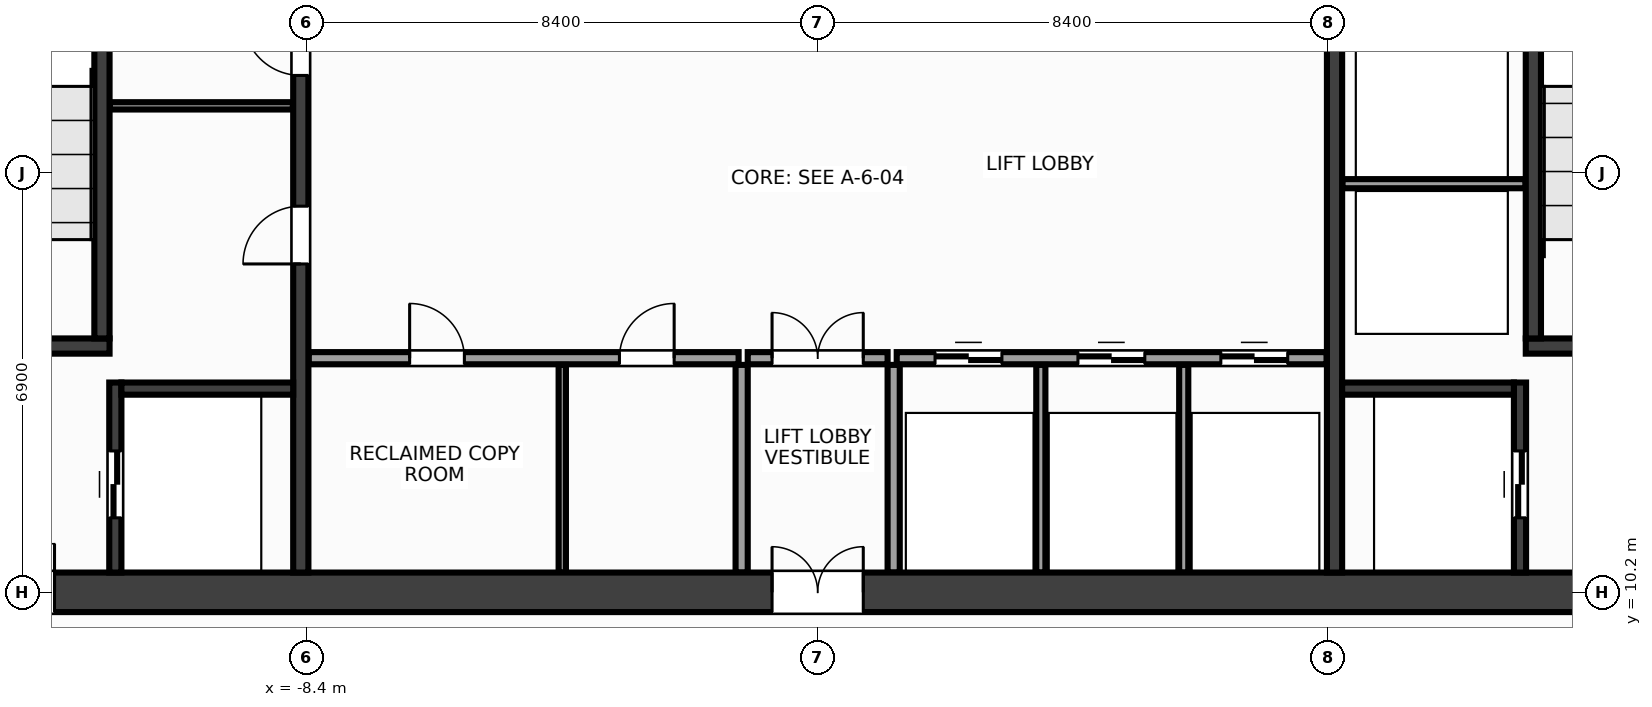
"""IFC4 building model, lengths in metres.
Left out: names, types, materials, properties, quantities, classifications, styles, units other than length and angle.
Written with IfcOpenShell. Run it as: python <this file> out.ifc"""

import sys

from ifc_helpers import new_model, si_unit, direction, frame, frame_2d, origin, place, context, subcontext, project, spatial, rectangle, extrude, source, transform, mapped, element, fill, save


model = new_model("IFC4")
c1 = context("Model", 3, precision=1e-05, world=origin(), true_north=direction((0.0, 1.0)))
c2 = subcontext(c1, "Body", "Model", "MODEL_VIEW")
j1 = project(units=[si_unit("LENGTHUNIT", "METRE"), si_unit("PLANEANGLEUNIT", "RADIAN")], contexts=[c1])
p1 = place(None, origin())
s1 = spatial("IfcSite", under=j1, at=p1, CompositionType="ELEMENT")
p2 = place(p1, origin())
s2 = spatial("IfcBuilding", under=s1, at=p2, CompositionType="ELEMENT")
p3 = place(p2, frame((0.0, 0.0, 120.8)))
s3 = spatial("IfcBuildingStorey", under=s2, at=p3, CompositionType="ELEMENT", Elevation=120.8)
m1 = source(origin(), c2, "Body", "SweptSolid", [
    extrude(rectangle(XDim=31.85, YDim=0.65, at=frame_2d((15.925, 0.0))), origin(), (0.0, 0.0, 1.0), 3.6),
])
p4 = place(p3, frame((-15.925, 10.2, 0.0), z_axis=(0.0, 0.0, 1.0), x_axis=(1.0, 0.0, 0.0)))
e1 = element("IfcWall", 1, at=p4, inside=s3, PredefinedType="SHEAR", context=c2, shape_type="MappedRepresentation", body=[
    mapped(m1, transform((0.0, 0.0, 0.0), x_axis=(1.0, 0.0, 0.0), y_axis=(0.0, 1.0, 0.0), z_axis=(0.0, 0.0, 1.0), scale=1.0)),
])
p5 = place(p4, frame((1.775, 0.0, 0.0)))
e2 = element("IfcOpeningElement", 2, at=p5, cuts=e1, PredefinedType="OPENING", context=c2, shape_type="SweptSolid", body=[
    extrude(rectangle(XDim=1.6, YDim=2.15, at=frame_2d((0.8, 1.075))), frame((0.0, 0.337, 0.0), z_axis=(0.0, -1.0, 0.0), x_axis=(1.0, 0.0, 0.0)), (0.0, 0.0, 1.0), 0.674),
])
p6 = place(p4, frame((28.475, 0.0, 0.0)))
e3 = element("IfcOpeningElement", 3, at=p6, cuts=e1, PredefinedType="OPENING", context=c2, shape_type="SweptSolid", body=[
    extrude(rectangle(XDim=1.6, YDim=2.15, at=frame_2d((0.8, 1.075))), frame((0.0, 0.337, 0.0), z_axis=(0.0, -1.0, 0.0), x_axis=(1.0, 0.0, 0.0)), (0.0, 0.0, 1.0), 0.674),
])
p7 = place(p4, frame((15.175, 0.0, 0.0)))
e4 = element("IfcOpeningElement", 4, at=p7, cuts=e1, PredefinedType="OPENING", context=c2, shape_type="SweptSolid", body=[
    extrude(rectangle(XDim=1.5, YDim=2.2, at=frame_2d((0.75, 1.1))), frame((0.0, 0.337, 0.0), z_axis=(0.0, -1.0, 0.0), x_axis=(1.0, 0.0, 0.0)), (0.0, 0.0, 1.0), 0.674),
])
m2 = source(origin(), c2, "Body", "SweptSolid", [
    extrude(rectangle(XDim=12.95, YDim=0.25, at=frame_2d((6.475, 0.0))), origin(), (0.0, 0.0, 1.0), 3.6),
])
p8 = place(p3, frame((-8.5, 10.525, 0.0), z_axis=(0.0, 0.0, 1.0), x_axis=(0.0, 1.0, 0.0)))
e5 = element("IfcWall", 5, at=p8, inside=s3, PredefinedType="SHEAR", context=c2, shape_type="MappedRepresentation", body=[
    mapped(m2, transform((0.0, 0.0, 0.0), x_axis=(1.0, 0.0, 0.0), y_axis=(0.0, 1.0, 0.0), z_axis=(0.0, 0.0, 1.0), scale=1.0)),
])
p9 = place(p8, frame((5.075, 0.0, 0.0)))
e6 = element("IfcOpeningElement", 6, at=p9, cuts=e5, PredefinedType="OPENING", context=c2, shape_type="SweptSolid", body=[
    extrude(rectangle(XDim=0.95, YDim=2.15, at=frame_2d((0.475, 1.075))), frame((0.0, 0.137, 0.0), z_axis=(0.0, -1.0, 0.0), x_axis=(1.0, 0.0, 0.0)), (0.0, 0.0, 1.0), 0.274),
])
p10 = place(p8, frame((8.175, 0.0, 0.0)))
e7 = element("IfcOpeningElement", 7, at=p10, cuts=e5, PredefinedType="OPENING", context=c2, shape_type="SweptSolid", body=[
    extrude(rectangle(XDim=0.95, YDim=2.15, at=frame_2d((0.475, 1.075))), frame((0.0, 0.137, 0.0), z_axis=(0.0, -1.0, 0.0), x_axis=(1.0, 0.0, 0.0)), (0.0, 0.0, 1.0), 0.274),
])
p11 = place(p3, frame((8.5, 10.525, 0.0), z_axis=(0.0, 0.0, 1.0), x_axis=(0.0, 1.0, 0.0)))
e8 = element("IfcWall", 8, at=p11, inside=s3, PredefinedType="SHEAR", context=c2, shape_type="MappedRepresentation", body=[
    mapped(m2, transform((0.0, 0.0, 0.0), x_axis=(1.0, 0.0, 0.0), y_axis=(0.0, 1.0, 0.0), z_axis=(0.0, 0.0, 1.0), scale=1.0)),
])
p12 = place(p11, frame((9.925, 0.0, 0.0)))
e9 = element("IfcOpeningElement", 9, at=p12, cuts=e8, PredefinedType="OPENING", context=c2, shape_type="SweptSolid", body=[
    extrude(rectangle(XDim=0.95, YDim=2.15, at=frame_2d((0.475, 1.075))), frame((0.0, 0.137, 0.0), z_axis=(0.0, -1.0, 0.0), x_axis=(1.0, 0.0, 0.0)), (0.0, 0.0, 1.0), 0.274),
])
m3 = source(origin(), c2, "Body", "SweptSolid", [
    extrude(rectangle(XDim=3.63, YDim=0.25, at=frame_2d((1.815, 0.0))), origin(), (0.0, 0.0, 1.0), 3.6),
])
p13 = place(p3, frame((-15.275, 14.25, 0.0), z_axis=(0.0, 0.0, 1.0), x_axis=(1.0, 0.0, 0.0)))
e10 = element("IfcWall", 10, at=p13, inside=s3, PredefinedType="SHEAR", context=c2, shape_type="MappedRepresentation", body=[
    mapped(m3, transform((0.0, 0.0, 0.0), x_axis=(1.0, 0.0, 0.0), y_axis=(0.0, 1.0, 0.0), z_axis=(0.0, 0.0, 1.0), scale=1.0)),
])
p14 = place(p13, frame((0.95, 0.0, 0.0)))
e11 = element("IfcOpeningElement", 11, at=p14, cuts=e10, PredefinedType="OPENING", context=c2, shape_type="SweptSolid", body=[
    extrude(rectangle(XDim=1.6, YDim=2.15, at=frame_2d((0.8, 1.075))), frame((0.0, 0.137, 0.0), z_axis=(0.0, -1.0, 0.0), x_axis=(1.0, 0.0, 0.0)), (0.0, 0.0, 1.0), 0.274),
])
m4 = source(origin(), c2, "Body", "SweptSolid", [
    extrude(rectangle(XDim=9.1, YDim=0.25, at=frame_2d((4.55, 0.0))), origin(), (0.0, 0.0, 1.0), 3.6),
])
p15 = place(p3, frame((-11.77, 14.375, 0.0), z_axis=(0.0, 0.0, 1.0), x_axis=(0.0, 1.0, 0.0)))
e12 = element("IfcWall", 12, at=p15, inside=s3, PredefinedType="SHEAR", context=c2, shape_type="MappedRepresentation", body=[
    mapped(m4, transform((0.0, 0.0, 0.0), x_axis=(1.0, 0.0, 0.0), y_axis=(0.0, 1.0, 0.0), z_axis=(0.0, 0.0, 1.0), scale=1.0)),
])
p16 = place(p3, frame((11.645, 14.25, 0.0), z_axis=(0.0, 0.0, 1.0), x_axis=(1.0, 0.0, 0.0)))
e13 = element("IfcWall", 13, at=p16, inside=s3, PredefinedType="SHEAR", context=c2, shape_type="MappedRepresentation", body=[
    mapped(m3, transform((0.0, 0.0, 0.0), x_axis=(1.0, 0.0, 0.0), y_axis=(0.0, 1.0, 0.0), z_axis=(0.0, 0.0, 1.0), scale=1.0)),
])
p17 = place(p16, frame((0.95, 0.0, 0.0)))
e14 = element("IfcOpeningElement", 14, at=p17, cuts=e13, PredefinedType="OPENING", context=c2, shape_type="SweptSolid", body=[
    extrude(rectangle(XDim=1.6, YDim=2.15, at=frame_2d((0.8, 1.075))), frame((0.0, 0.137, 0.0), z_axis=(0.0, -1.0, 0.0), x_axis=(1.0, 0.0, 0.0)), (0.0, 0.0, 1.0), 0.274),
])
p18 = place(p3, frame((11.77, 14.375, 0.0), z_axis=(0.0, 0.0, 1.0), x_axis=(0.0, 1.0, 0.0)))
e15 = element("IfcWall", 15, at=p18, inside=s3, PredefinedType="SHEAR", context=c2, shape_type="MappedRepresentation", body=[
    mapped(m4, transform((0.0, 0.0, 0.0), x_axis=(1.0, 0.0, 0.0), y_axis=(0.0, 1.0, 0.0), z_axis=(0.0, 0.0, 1.0), scale=1.0)),
])
m5 = source(origin(), c2, "Body", "SweptSolid", [
    extrude(rectangle(XDim=3.125, YDim=0.2, at=frame_2d((1.562, 0.0))), origin(), (0.0, 0.0, 1.0), 3.6),
])
p19 = place(p3, frame((-11.55, 10.525, 0.0), z_axis=(0.0, 0.0, 1.0), x_axis=(0.0, 1.0, 0.0)))
e16 = element("IfcWall", 16, at=p19, inside=s3, PredefinedType="SHEAR", context=c2, shape_type="MappedRepresentation", body=[
    mapped(m5, transform((0.0, 0.0, 0.0), x_axis=(1.0, 0.0, 0.0), y_axis=(0.0, 1.0, 0.0), z_axis=(0.0, 0.0, 1.0), scale=1.0)),
])
p20 = place(p19, frame((0.9, 0.0, 0.0)))
e17 = element("IfcOpeningElement", 17, at=p20, cuts=e16, PredefinedType="OPENING", context=c2, shape_type="SweptSolid", body=[
    extrude(rectangle(XDim=1.1, YDim=2.15, at=frame_2d((0.55, 1.075))), frame((0.0, 0.112, 0.0), z_axis=(0.0, -1.0, 0.0), x_axis=(1.0, 0.0, 0.0)), (0.0, 0.0, 1.0), 0.224),
])
m6 = source(origin(), c2, "Body", "SweptSolid", [
    extrude(rectangle(XDim=2.825, YDim=0.2, at=frame_2d((1.413, 0.0))), origin(), (0.0, 0.0, 1.0), 3.6),
])
p21 = place(p3, frame((-11.45, 13.55, 0.0), z_axis=(0.0, 0.0, 1.0), x_axis=(1.0, 0.0, 0.0)))
e18 = element("IfcWall", 18, at=p21, inside=s3, PredefinedType="SHEAR", context=c2, shape_type="MappedRepresentation", body=[
    mapped(m6, transform((0.0, 0.0, 0.0), x_axis=(1.0, 0.0, 0.0), y_axis=(0.0, 1.0, 0.0), z_axis=(0.0, 0.0, 1.0), scale=1.0)),
])
p22 = place(p3, frame((11.55, 10.525, 0.0), z_axis=(0.0, 0.0, 1.0), x_axis=(0.0, 1.0, 0.0)))
e19 = element("IfcWall", 19, at=p22, inside=s3, PredefinedType="SHEAR", context=c2, shape_type="MappedRepresentation", body=[
    mapped(m5, transform((0.0, 0.0, 0.0), x_axis=(1.0, 0.0, 0.0), y_axis=(0.0, 1.0, 0.0), z_axis=(0.0, 0.0, 1.0), scale=1.0)),
])
p23 = place(p22, frame((0.9, 0.0, 0.0)))
e20 = element("IfcOpeningElement", 20, at=p23, cuts=e19, PredefinedType="OPENING", context=c2, shape_type="SweptSolid", body=[
    extrude(rectangle(XDim=1.1, YDim=2.15, at=frame_2d((0.55, 1.075))), frame((0.0, 0.112, 0.0), z_axis=(0.0, -1.0, 0.0), x_axis=(1.0, 0.0, 0.0)), (0.0, 0.0, 1.0), 0.224),
])
p24 = place(p3, frame((8.625, 13.55, 0.0), z_axis=(0.0, 0.0, 1.0), x_axis=(1.0, 0.0, 0.0)))
e21 = element("IfcWall", 21, at=p24, inside=s3, PredefinedType="SHEAR", context=c2, shape_type="MappedRepresentation", body=[
    mapped(m6, transform((0.0, 0.0, 0.0), x_axis=(1.0, 0.0, 0.0), y_axis=(0.0, 1.0, 0.0), z_axis=(0.0, 0.0, 1.0), scale=1.0)),
])
m7 = source(origin(), c2, "Body", "SweptSolid", [
    extrude(rectangle(XDim=3.01, YDim=0.12, at=frame_2d((1.505, 0.0))), origin(), (0.0, 0.0, 1.0), 3.3),
])
p25 = place(p3, frame((-11.64, 18.2, 0.0), z_axis=(0.0, 0.0, 1.0), x_axis=(1.0, 0.0, 0.0)))
e22 = element("IfcWall", 22, at=p25, inside=s3, PredefinedType="PARTITIONING", context=c2, shape_type="MappedRepresentation", body=[
    mapped(m7, transform((0.0, 0.0, 0.0), x_axis=(1.0, 0.0, 0.0), y_axis=(0.0, 1.0, 0.0), z_axis=(0.0, 0.0, 1.0), scale=1.0)),
])
m8 = source(origin(), c2, "Body", "SweptSolid", [
    extrude(rectangle(XDim=3.01, YDim=0.15, at=frame_2d((1.505, 0.0))), origin(), (0.0, 0.0, 1.0), 3.3),
])
p26 = place(p3, frame((8.63, 16.92, 0.0), z_axis=(0.0, 0.0, 1.0), x_axis=(1.0, 0.0, 0.0)))
e23 = element("IfcWall", 23, at=p26, inside=s3, PredefinedType="PARTITIONING", context=c2, shape_type="MappedRepresentation", body=[
    mapped(m8, transform((0.0, 0.0, 0.0), x_axis=(1.0, 0.0, 0.0), y_axis=(0.0, 1.0, 0.0), z_axis=(0.0, 0.0, 1.0), scale=1.0)),
])
m9 = source(origin(), c2, "Body", "SweptSolid", [
    extrude(rectangle(XDim=7.07, YDim=0.2, at=frame_2d((3.535, 0.0))), origin(), (0.0, 0.0, 1.0), 3.3),
])
p27 = place(p3, frame((-8.37, 14.05, 0.0), z_axis=(0.0, 0.0, 1.0), x_axis=(1.0, 0.0, 0.0)))
e24 = element("IfcWall", 24, at=p27, inside=s3, PredefinedType="PARTITIONING", context=c2, shape_type="MappedRepresentation", body=[
    mapped(m9, transform((0.0, 0.0, 0.0), x_axis=(1.0, 0.0, 0.0), y_axis=(0.0, 1.0, 0.0), z_axis=(0.0, 0.0, 1.0), scale=1.0)),
])
p28 = place(p27, frame((1.66, 0.0, 0.0)))
e25 = element("IfcOpeningElement", 25, at=p28, cuts=e24, PredefinedType="OPENING", context=c2, shape_type="SweptSolid", body=[
    extrude(rectangle(XDim=0.9, YDim=2.15, at=frame_2d((0.45, 1.075))), frame((0.0, 0.112, 0.0), z_axis=(0.0, -1.0, 0.0), x_axis=(1.0, 0.0, 0.0)), (0.0, 0.0, 1.0), 0.224),
])
p29 = place(p27, frame((5.11, 0.0, 0.0)))
e26 = element("IfcOpeningElement", 26, at=p29, cuts=e24, PredefinedType="OPENING", context=c2, shape_type="SweptSolid", body=[
    extrude(rectangle(XDim=0.9, YDim=2.15, at=frame_2d((0.45, 1.075))), frame((0.0, 0.112, 0.0), z_axis=(0.0, -1.0, 0.0), x_axis=(1.0, 0.0, 0.0)), (0.0, 0.0, 1.0), 0.224),
])
p30 = place(p3, frame((1.3, 14.05, 0.0), z_axis=(0.0, 0.0, 1.0), x_axis=(1.0, 0.0, 0.0)))
e27 = element("IfcWall", 27, at=p30, inside=s3, PredefinedType="PARTITIONING", context=c2, shape_type="MappedRepresentation", body=[
    mapped(m9, transform((0.0, 0.0, 0.0), x_axis=(1.0, 0.0, 0.0), y_axis=(0.0, 1.0, 0.0), z_axis=(0.0, 0.0, 1.0), scale=1.0)),
])
p31 = place(p30, frame((0.63, 0.0, 0.0)))
e28 = element("IfcOpeningElement", 28, at=p31, cuts=e27, PredefinedType="OPENING", context=c2, shape_type="SweptSolid", body=[
    extrude(rectangle(XDim=1.1, YDim=2.15, at=frame_2d((0.55, 1.075))), frame((0.0, 0.112, 0.0), z_axis=(0.0, -1.0, 0.0), x_axis=(1.0, 0.0, 0.0)), (0.0, 0.0, 1.0), 0.224),
])
p32 = place(p30, frame((2.98, 0.0, 0.0)))
e29 = element("IfcOpeningElement", 29, at=p32, cuts=e27, PredefinedType="OPENING", context=c2, shape_type="SweptSolid", body=[
    extrude(rectangle(XDim=1.1, YDim=2.15, at=frame_2d((0.55, 1.075))), frame((0.0, 0.112, 0.0), z_axis=(0.0, -1.0, 0.0), x_axis=(1.0, 0.0, 0.0)), (0.0, 0.0, 1.0), 0.224),
])
p33 = place(p30, frame((5.33, 0.0, 0.0)))
e30 = element("IfcOpeningElement", 30, at=p33, cuts=e27, PredefinedType="OPENING", context=c2, shape_type="SweptSolid", body=[
    extrude(rectangle(XDim=1.1, YDim=2.15, at=frame_2d((0.55, 1.075))), frame((0.0, 0.112, 0.0), z_axis=(0.0, -1.0, 0.0), x_axis=(1.0, 0.0, 0.0)), (0.0, 0.0, 1.0), 0.224),
])
m10 = source(origin(), c2, "Body", "SweptSolid", [
    extrude(rectangle(XDim=3.415, YDim=0.2, at=frame_2d((1.708, 0.0))), origin(), (0.0, 0.0, 1.0), 3.3),
])
for number, where, z_axis, x_axis in (
    (31, (-1.25, 10.525, 0.0), (0.0, 0.0, 1.0), (0.0, 1.0, 0.0)),
    (32, (1.25, 10.525, 0.0), (0.0, 0.0, 1.0), (0.0, 1.0, 0.0)),
):
    element("IfcWall", number, at=place(p3, frame(where, z_axis=z_axis, x_axis=x_axis)), inside=s3, PredefinedType="PARTITIONING", context=c2, shape_type="MappedRepresentation", body=[
        mapped(m10, transform((0.0, 0.0, 0.0), x_axis=(1.0, 0.0, 0.0), y_axis=(0.0, 1.0, 0.0), z_axis=(0.0, 0.0, 1.0), scale=1.0)),
    ])
m11 = source(origin(), c2, "Body", "SweptSolid", [
    extrude(rectangle(XDim=2.3, YDim=0.2, at=frame_2d((1.15, 0.0))), origin(), (0.0, 0.0, 1.0), 3.3),
])
p34 = place(p3, frame((-1.15, 14.05, 0.0), z_axis=(0.0, 0.0, 1.0), x_axis=(1.0, 0.0, 0.0)))
e33 = element("IfcWall", 33, at=p34, inside=s3, PredefinedType="PARTITIONING", context=c2, shape_type="MappedRepresentation", body=[
    mapped(m11, transform((0.0, 0.0, 0.0), x_axis=(1.0, 0.0, 0.0), y_axis=(0.0, 1.0, 0.0), z_axis=(0.0, 0.0, 1.0), scale=1.0)),
])
p35 = place(p34, frame((0.4, 0.0, 0.0)))
e34 = element("IfcOpeningElement", 34, at=p35, cuts=e33, PredefinedType="OPENING", context=c2, shape_type="SweptSolid", body=[
    extrude(rectangle(XDim=1.5, YDim=2.2, at=frame_2d((0.75, 1.1))), frame((0.0, 0.112, 0.0), z_axis=(0.0, -1.0, 0.0), x_axis=(1.0, 0.0, 0.0)), (0.0, 0.0, 1.0), 0.224),
])
m12 = source(origin(), c2, "Body", "SweptSolid", [
    extrude(rectangle(XDim=3.415, YDim=0.12, at=frame_2d((1.708, 0.0))), origin(), (0.0, 0.0, 1.0), 3.3),
])
p36 = place(p3, frame((-4.2, 10.525, 0.0), z_axis=(0.0, 0.0, 1.0), x_axis=(0.0, 1.0, 0.0)))
e35 = element("IfcWall", 35, at=p36, inside=s3, PredefinedType="PARTITIONING", context=c2, shape_type="MappedRepresentation", body=[
    mapped(m12, transform((0.0, 0.0, 0.0), x_axis=(1.0, 0.0, 0.0), y_axis=(0.0, 1.0, 0.0), z_axis=(0.0, 0.0, 1.0), scale=1.0)),
])
m13 = source(origin(), c2, "Body", "SweptSolid", [
    extrude(rectangle(XDim=3.415, YDim=0.15, at=frame_2d((1.708, 0.0))), origin(), (0.0, 0.0, 1.0), 3.3),
])
for number, where, z_axis, x_axis in (
    (36, (3.67, 10.525, 0.0), (0.0, 0.0, 1.0), (0.0, 1.0, 0.0)),
    (37, (6.02, 10.525, 0.0), (0.0, 0.0, 1.0), (0.0, 1.0, 0.0)),
):
    element("IfcWall", number, at=place(p3, frame(where, z_axis=z_axis, x_axis=x_axis)), inside=s3, PredefinedType="PARTITIONING", context=c2, shape_type="MappedRepresentation", body=[
        mapped(m13, transform((0.0, 0.0, 0.0), x_axis=(1.0, 0.0, 0.0), y_axis=(0.0, 1.0, 0.0), z_axis=(0.0, 0.0, 1.0), scale=1.0)),
    ])
m14 = source(origin(), c2, "Body", "SweptSolid", [
    extrude(rectangle(XDim=1.6, YDim=2.15, at=frame_2d((0.8, 1.075))), frame((0.0, 0.025, 0.0), z_axis=(0.0, -1.0, 0.0), x_axis=(1.0, 0.0, 0.0)), (0.0, 0.0, 1.0), 0.05),
])
p37 = place(p5, origin())
e38 = element("IfcDoor", 38, at=p37, inside=s3, OperationType="DOUBLE_DOOR_SINGLE_SWING", PredefinedType="DOOR", context=c2, shape_type="MappedRepresentation", body=[
    mapped(m14, transform((0.0, 0.0, 0.0), x_axis=(1.0, 0.0, 0.0), y_axis=(0.0, 1.0, 0.0), z_axis=(0.0, 0.0, 1.0), scale=1.0)),
])
fill(e2, e38)
m15 = source(origin(), c2, "Body", "SweptSolid", [
    extrude(rectangle(XDim=1.1, YDim=2.15, at=frame_2d((0.55, 1.075))), frame((0.0, 0.025, 0.0), z_axis=(0.0, -1.0, 0.0), x_axis=(1.0, 0.0, 0.0)), (0.0, 0.0, 1.0), 0.05),
])
p38 = place(p20, origin())
e39 = element("IfcDoor", 39, at=p38, inside=s3, OperationType="DOUBLE_DOOR_SLIDING", PredefinedType="DOOR", context=c2, shape_type="MappedRepresentation", body=[
    mapped(m15, transform((0.0, 0.0, 0.0), x_axis=(1.0, 0.0, 0.0), y_axis=(0.0, 1.0, 0.0), z_axis=(0.0, 0.0, 1.0), scale=1.0)),
])
fill(e17, e39)
p39 = place(p23, origin())
e40 = element("IfcDoor", 40, at=p39, inside=s3, OperationType="DOUBLE_DOOR_SLIDING", PredefinedType="DOOR", context=c2, shape_type="MappedRepresentation", body=[
    mapped(m15, transform((0.0, 0.0, 0.0), x_axis=(1.0, 0.0, 0.0), y_axis=(0.0, 1.0, 0.0), z_axis=(0.0, 0.0, 1.0), scale=1.0)),
])
fill(e20, e40)
m16 = source(origin(), c2, "Body", "SweptSolid", [
    extrude(rectangle(XDim=0.95, YDim=2.15, at=frame_2d((0.475, 1.075))), frame((0.0, 0.025, 0.0), z_axis=(0.0, -1.0, 0.0), x_axis=(1.0, 0.0, 0.0)), (0.0, 0.0, 1.0), 0.05),
])
p40 = place(p9, origin())
e41 = element("IfcDoor", 41, at=p40, inside=s3, OperationType="SINGLE_SWING_LEFT", PredefinedType="DOOR", context=c2, shape_type="MappedRepresentation", body=[
    mapped(m16, transform((0.0, 0.0, 0.0), x_axis=(1.0, 0.0, 0.0), y_axis=(0.0, 1.0, 0.0), z_axis=(0.0, 0.0, 1.0), scale=1.0)),
])
fill(e6, e41)
p41 = place(p10, origin())
e42 = element("IfcDoor", 42, at=p41, inside=s3, OperationType="SINGLE_SWING_RIGHT", PredefinedType="DOOR", context=c2, shape_type="MappedRepresentation", body=[
    mapped(m16, transform((0.0, 0.0, 0.0), x_axis=(1.0, 0.0, 0.0), y_axis=(0.0, 1.0, 0.0), z_axis=(0.0, 0.0, 1.0), scale=1.0)),
])
fill(e7, e42)
m17 = source(origin(), c2, "Body", "SweptSolid", [
    extrude(rectangle(XDim=0.9, YDim=2.15, at=frame_2d((0.45, 1.075))), frame((0.0, 0.025, 0.0), z_axis=(0.0, -1.0, 0.0), x_axis=(1.0, 0.0, 0.0)), (0.0, 0.0, 1.0), 0.05),
])
p42 = place(p28, origin())
e43 = element("IfcDoor", 43, at=p42, inside=s3, OperationType="SINGLE_SWING_LEFT", PredefinedType="DOOR", context=c2, shape_type="MappedRepresentation", body=[
    mapped(m17, transform((0.0, 0.0, 0.0), x_axis=(1.0, 0.0, 0.0), y_axis=(0.0, 1.0, 0.0), z_axis=(0.0, 0.0, 1.0), scale=1.0)),
])
fill(e25, e43)
p43 = place(p29, origin())
e44 = element("IfcDoor", 44, at=p43, inside=s3, OperationType="SINGLE_SWING_RIGHT", PredefinedType="DOOR", context=c2, shape_type="MappedRepresentation", body=[
    mapped(m17, transform((0.0, 0.0, 0.0), x_axis=(1.0, 0.0, 0.0), y_axis=(0.0, 1.0, 0.0), z_axis=(0.0, 0.0, 1.0), scale=1.0)),
])
fill(e26, e44)
p44 = place(p31, origin())
e45 = element("IfcDoor", 45, at=p44, inside=s3, OperationType="DOUBLE_DOOR_SLIDING", PredefinedType="DOOR", context=c2, shape_type="MappedRepresentation", body=[
    mapped(m15, transform((0.0, 0.0, 0.0), x_axis=(1.0, 0.0, 0.0), y_axis=(0.0, 1.0, 0.0), z_axis=(0.0, 0.0, 1.0), scale=1.0)),
])
fill(e28, e45)
p45 = place(p32, origin())
e46 = element("IfcDoor", 46, at=p45, inside=s3, OperationType="DOUBLE_DOOR_SLIDING", PredefinedType="DOOR", context=c2, shape_type="MappedRepresentation", body=[
    mapped(m15, transform((0.0, 0.0, 0.0), x_axis=(1.0, 0.0, 0.0), y_axis=(0.0, 1.0, 0.0), z_axis=(0.0, 0.0, 1.0), scale=1.0)),
])
fill(e29, e46)
p46 = place(p33, origin())
e47 = element("IfcDoor", 47, at=p46, inside=s3, OperationType="DOUBLE_DOOR_SLIDING", PredefinedType="DOOR", context=c2, shape_type="MappedRepresentation", body=[
    mapped(m15, transform((0.0, 0.0, 0.0), x_axis=(1.0, 0.0, 0.0), y_axis=(0.0, 1.0, 0.0), z_axis=(0.0, 0.0, 1.0), scale=1.0)),
])
fill(e30, e47)
m18 = source(origin(), c2, "Body", "SweptSolid", [
    extrude(rectangle(XDim=1.5, YDim=2.2, at=frame_2d((0.75, 1.1))), frame((0.0, 0.025, 0.0), z_axis=(0.0, -1.0, 0.0), x_axis=(1.0, 0.0, 0.0)), (0.0, 0.0, 1.0), 0.05),
])
p47 = place(p35, origin())
e48 = element("IfcDoor", 48, at=p47, inside=s3, OperationType="DOUBLE_DOOR_SINGLE_SWING", PredefinedType="DOOR", context=c2, shape_type="MappedRepresentation", body=[
    mapped(m18, transform((0.0, 0.0, 0.0), x_axis=(1.0, 0.0, 0.0), y_axis=(0.0, 1.0, 0.0), z_axis=(0.0, 0.0, 1.0), scale=1.0)),
])
fill(e34, e48)
p48 = place(p7, origin())
e49 = element("IfcDoor", 49, at=p48, inside=s3, OperationType="DOUBLE_DOOR_SINGLE_SWING", PredefinedType="DOOR", context=c2, shape_type="MappedRepresentation", body=[
    mapped(m18, transform((0.0, 0.0, 0.0), x_axis=(1.0, 0.0, 0.0), y_axis=(0.0, 1.0, 0.0), z_axis=(0.0, 0.0, 1.0), scale=1.0)),
])
fill(e4, e49)
save(model, sys.argv[1])
